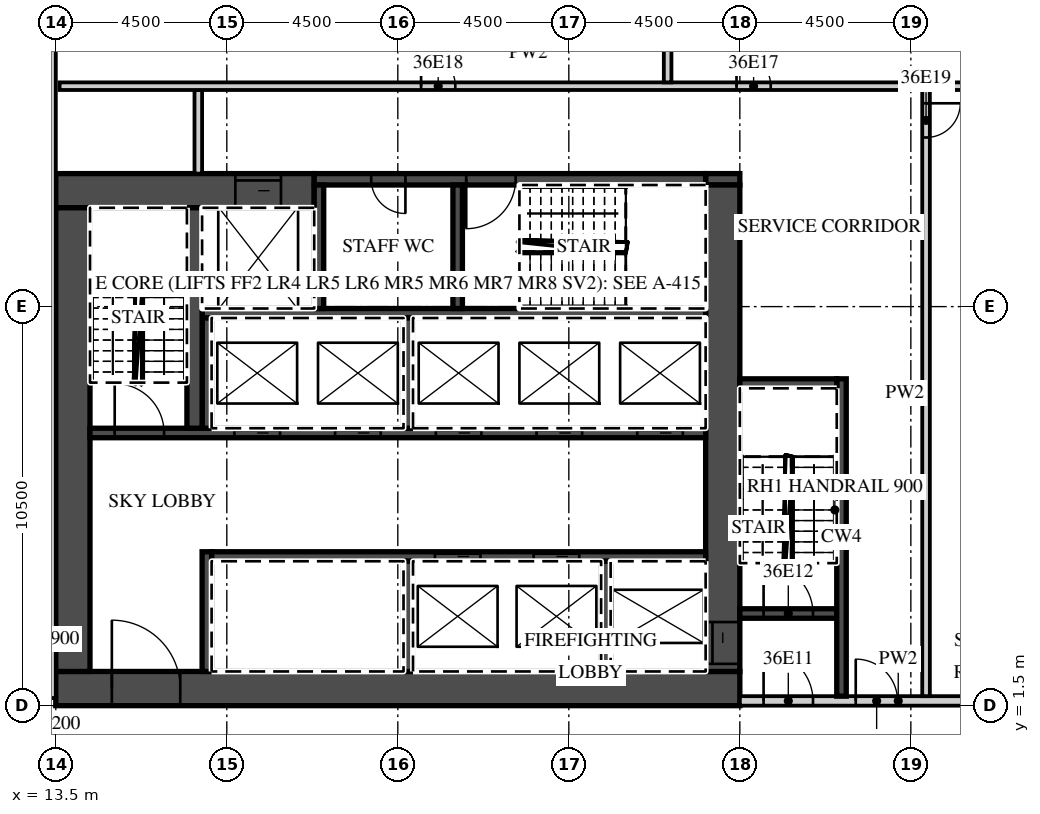
"""IFC4 building model, lengths in metres.
Left out: names, types, materials, properties, quantities, classifications, styles, units other than length and angle.
Written with IfcOpenShell. Run it as: python <this file> out.ifc"""

import sys

from ifc_helpers import new_model, si_unit, direction, frame, frame_2d, origin, place, context, subcontext, project, spatial, rectangle, extrude, element, fill, save


model = new_model("IFC4")
c1 = context("Model", 3, precision=1e-05, world=origin(), true_north=direction((0.0, 1.0)))
c2 = subcontext(c1, "Body", "Model", "MODEL_VIEW")
j1 = project(units=[si_unit("LENGTHUNIT", "METRE"), si_unit("PLANEANGLEUNIT", "RADIAN")], contexts=[c1])
p1 = place(None, origin())
s1 = spatial("IfcSite", under=j1, at=p1, CompositionType="ELEMENT")
p2 = place(p1, origin())
s2 = spatial("IfcBuilding", under=s1, at=p2, CompositionType="ELEMENT")
p3 = place(p2, frame((0.0, 0.0, 155.0)))
s3 = spatial("IfcBuildingStorey", under=s2, at=p3, CompositionType="ELEMENT", Elevation=155.0)
p4 = place(p3, frame((13.5, 1.95, 0.0), z_axis=(0.0, 0.0, 1.0), x_axis=(1.0, 0.0, 0.0)))
e1 = element("IfcWall", 1, at=p4, inside=s3, PredefinedType="SHEAR", context=c2, shape_type="SweptSolid", body=[
    extrude(rectangle(XDim=18.0, YDim=0.9, at=frame_2d((9.0, 0.0))), origin(), (0.0, 0.0, 1.0), 7.0),
])
p5 = place(p4, frame((1.475, 0.0, 0.0)))
e2 = element("IfcOpeningElement", 2, at=p5, cuts=e1, PredefinedType="OPENING", context=c2, shape_type="SweptSolid", body=[
    extrude(rectangle(XDim=1.8, YDim=2.1, at=frame_2d((0.9, 1.05))), frame((0.0, 0.46, 0.0), z_axis=(0.0, -1.0, 0.0), x_axis=(1.0, 0.0, 0.0)), (0.0, 0.0, 1.0), 0.92),
])
p6 = place(p3, frame((13.5, 15.05, 0.0), z_axis=(0.0, 0.0, 1.0), x_axis=(1.0, 0.0, 0.0)))
e3 = element("IfcWall", 3, at=p6, inside=s3, PredefinedType="SHEAR", context=c2, shape_type="SweptSolid", body=[
    extrude(rectangle(XDim=6.8, YDim=0.9, at=frame_2d((3.4, 0.0))), origin(), (0.0, 0.0, 1.0), 7.0),
])
p7 = place(p6, frame((4.725, 0.0, 0.0)))
e4 = element("IfcOpeningElement", 4, at=p7, cuts=e3, PredefinedType="OPENING", context=c2, shape_type="SweptSolid", body=[
    extrude(rectangle(XDim=1.2, YDim=2.1, at=frame_2d((0.6, 1.05))), frame((0.0, 0.46, 0.0), z_axis=(0.0, -1.0, 0.0), x_axis=(1.0, 0.0, 0.0)), (0.0, 0.0, 1.0), 0.92),
])
p8 = place(p3, frame((30.6, 15.35, 0.0), z_axis=(0.0, 0.0, 1.0), x_axis=(1.0, 0.0, 0.0)))
e5 = element("IfcWall", 5, at=p8, inside=s3, PredefinedType="SHEAR", context=c2, shape_type="SweptSolid", body=[
    extrude(rectangle(XDim=0.9, YDim=0.3, at=frame_2d((0.45, 0.0))), origin(), (0.0, 0.0, 1.0), 7.0),
])
p9 = place(p3, frame((20.3, 15.35, 0.0), z_axis=(0.0, 0.0, 1.0), x_axis=(1.0, 0.0, 0.0)))
e6 = element("IfcWall", 6, at=p9, inside=s3, PredefinedType="SHEAR", context=c2, shape_type="SweptSolid", body=[
    extrude(rectangle(XDim=10.3, YDim=0.3, at=frame_2d((5.15, 0.0))), origin(), (0.0, 0.0, 1.0), 7.0),
])
p10 = place(p9, frame((4.0, 0.0, 0.0)))
e7 = element("IfcOpeningElement", 7, at=p10, cuts=e6, PredefinedType="OPENING", context=c2, shape_type="SweptSolid", body=[
    extrude(rectangle(XDim=1.3, YDim=2.1, at=frame_2d((0.65, 1.05))), frame((0.0, 0.16, 0.0), z_axis=(0.0, -1.0, 0.0), x_axis=(1.0, 0.0, 0.0)), (0.0, 0.0, 1.0), 0.32),
])
p11 = place(p9, frame((1.5, 0.0, 0.0)))
e8 = element("IfcOpeningElement", 8, at=p11, cuts=e6, PredefinedType="OPENING", context=c2, shape_type="SweptSolid", body=[
    extrude(rectangle(XDim=0.9, YDim=2.1, at=frame_2d((0.45, 1.05))), frame((0.0, 0.16, 0.0), z_axis=(0.0, -1.0, 0.0), x_axis=(1.0, 0.0, 0.0)), (0.0, 0.0, 1.0), 0.32),
])
p12 = place(p3, frame((31.05, 2.4, 0.0), z_axis=(0.0, 0.0, 1.0), x_axis=(0.0, 1.0, 0.0)))
e9 = element("IfcWall", 9, at=p12, inside=s3, PredefinedType="SHEAR", context=c2, shape_type="SweptSolid", body=[
    extrude(rectangle(XDim=12.8, YDim=0.9, at=frame_2d((6.4, 0.0))), origin(), (0.0, 0.0, 1.0), 7.0),
])
p13 = place(p12, frame((0.2, 0.0, 0.0)))
e10 = element("IfcOpeningElement", 10, at=p13, cuts=e9, PredefinedType="OPENING", context=c2, shape_type="SweptSolid", body=[
    extrude(rectangle(XDim=1.1, YDim=2.1, at=frame_2d((0.55, 1.05))), frame((0.0, 0.46, 0.0), z_axis=(0.0, -1.0, 0.0), x_axis=(1.0, 0.0, 0.0)), (0.0, 0.0, 1.0), 0.92),
])
p14 = place(p3, frame((13.95, 2.4, 0.0), z_axis=(0.0, 0.0, 1.0), x_axis=(0.0, 1.0, 0.0)))
e11 = element("IfcWall", 11, at=p14, inside=s3, PredefinedType="SHEAR", context=c2, shape_type="SweptSolid", body=[
    extrude(rectangle(XDim=12.2, YDim=0.9, at=frame_2d((6.1, 0.0))), origin(), (0.0, 0.0, 1.0), 7.0),
])
p15 = place(p3, frame((17.6, 5.425, 0.0), z_axis=(0.0, 0.0, 1.0), x_axis=(1.0, 0.0, 0.0)))
e12 = element("IfcWall", 12, at=p15, inside=s3, PredefinedType="SHEAR", context=c2, shape_type="SweptSolid", body=[
    extrude(rectangle(XDim=13.0, YDim=0.25, at=frame_2d((6.5, 0.0))), origin(), (0.0, 0.0, 1.0), 7.0),
])
p16 = place(p15, frame((8.475, 0.0, 0.0)))
e13 = element("IfcOpeningElement", 13, at=p16, cuts=e12, PredefinedType="OPENING", context=c2, shape_type="SweptSolid", body=[
    extrude(rectangle(XDim=1.2, YDim=2.1, at=frame_2d((0.6, 1.05))), frame((0.0, 0.135, 0.0), z_axis=(0.0, -1.0, 0.0), x_axis=(1.0, 0.0, 0.0)), (0.0, 0.0, 1.0), 0.27),
])
p17 = place(p15, frame((5.875, 0.0, 0.0)))
e14 = element("IfcOpeningElement", 14, at=p17, cuts=e12, PredefinedType="OPENING", context=c2, shape_type="SweptSolid", body=[
    extrude(rectangle(XDim=1.2, YDim=2.1, at=frame_2d((0.6, 1.05))), frame((0.0, 0.135, 0.0), z_axis=(0.0, -1.0, 0.0), x_axis=(1.0, 0.0, 0.0)), (0.0, 0.0, 1.0), 0.27),
])
p18 = place(p3, frame((17.475, 2.4, 0.0), z_axis=(0.0, 0.0, 1.0), x_axis=(0.0, 1.0, 0.0)))
e15 = element("IfcWall", 15, at=p18, inside=s3, PredefinedType="SHEAR", context=c2, shape_type="SweptSolid", body=[
    extrude(rectangle(XDim=3.15, YDim=0.25, at=frame_2d((1.575, 0.0))), origin(), (0.0, 0.0, 1.0), 7.0),
])
for number, where, z_axis, x_axis in (
    (16, (27.975, 2.4, 0.0), (0.0, 0.0, 1.0), (0.0, 1.0, 0.0)),
    (17, (22.775, 2.4, 0.0), (0.0, 0.0, 1.0), (0.0, 1.0, 0.0)),
):
    element("IfcWall", number, at=place(p3, frame(where, z_axis=z_axis, x_axis=x_axis)), inside=s3, PredefinedType="SHEAR", context=c2, shape_type="SweptSolid", body=[
        extrude(rectangle(XDim=2.9, YDim=0.25, at=frame_2d((1.45, 0.0))), origin(), (0.0, 0.0, 1.0), 7.0),
    ])
p19 = place(p3, frame((14.4, 8.675, 0.0), z_axis=(0.0, 0.0, 1.0), x_axis=(1.0, 0.0, 0.0)))
e18 = element("IfcWall", 18, at=p19, inside=s3, PredefinedType="SHEAR", context=c2, shape_type="SweptSolid", body=[
    extrude(rectangle(XDim=16.2, YDim=0.25, at=frame_2d((8.1, 0.0))), origin(), (0.0, 0.0, 1.0), 7.0),
])
p20 = place(p19, frame((14.4, 0.0, 0.0)))
e19 = element("IfcOpeningElement", 19, at=p20, cuts=e18, PredefinedType="OPENING", context=c2, shape_type="SweptSolid", body=[
    extrude(rectangle(XDim=1.2, YDim=2.1, at=frame_2d((0.6, 1.05))), frame((0.0, 0.135, 0.0), z_axis=(0.0, -1.0, 0.0), x_axis=(1.0, 0.0, 0.0)), (0.0, 0.0, 1.0), 0.27),
])
p21 = place(p19, frame((11.75, 0.0, 0.0)))
e20 = element("IfcOpeningElement", 20, at=p21, cuts=e18, PredefinedType="OPENING", context=c2, shape_type="SweptSolid", body=[
    extrude(rectangle(XDim=1.2, YDim=2.1, at=frame_2d((0.6, 1.05))), frame((0.0, 0.135, 0.0), z_axis=(0.0, -1.0, 0.0), x_axis=(1.0, 0.0, 0.0)), (0.0, 0.0, 1.0), 0.27),
])
p22 = place(p19, frame((9.1, 0.0, 0.0)))
e21 = element("IfcOpeningElement", 21, at=p22, cuts=e18, PredefinedType="OPENING", context=c2, shape_type="SweptSolid", body=[
    extrude(rectangle(XDim=1.2, YDim=2.1, at=frame_2d((0.6, 1.05))), frame((0.0, 0.135, 0.0), z_axis=(0.0, -1.0, 0.0), x_axis=(1.0, 0.0, 0.0)), (0.0, 0.0, 1.0), 0.27),
])
p23 = place(p19, frame((6.45, 0.0, 0.0)))
e22 = element("IfcOpeningElement", 22, at=p23, cuts=e18, PredefinedType="OPENING", context=c2, shape_type="SweptSolid", body=[
    extrude(rectangle(XDim=1.2, YDim=2.1, at=frame_2d((0.6, 1.05))), frame((0.0, 0.135, 0.0), z_axis=(0.0, -1.0, 0.0), x_axis=(1.0, 0.0, 0.0)), (0.0, 0.0, 1.0), 0.27),
])
p24 = place(p19, frame((3.8, 0.0, 0.0)))
e23 = element("IfcOpeningElement", 23, at=p24, cuts=e18, PredefinedType="OPENING", context=c2, shape_type="SweptSolid", body=[
    extrude(rectangle(XDim=1.2, YDim=2.1, at=frame_2d((0.6, 1.05))), frame((0.0, 0.135, 0.0), z_axis=(0.0, -1.0, 0.0), x_axis=(1.0, 0.0, 0.0)), (0.0, 0.0, 1.0), 0.27),
])
p25 = place(p19, frame((0.65, 0.0, 0.0)))
e24 = element("IfcOpeningElement", 24, at=p25, cuts=e18, PredefinedType="OPENING", context=c2, shape_type="SweptSolid", body=[
    extrude(rectangle(XDim=1.3, YDim=2.1, at=frame_2d((0.65, 1.05))), frame((0.0, 0.135, 0.0), z_axis=(0.0, -1.0, 0.0), x_axis=(1.0, 0.0, 0.0)), (0.0, 0.0, 1.0), 0.27),
])
p26 = place(p3, frame((17.35, 11.825, 0.0), z_axis=(0.0, 0.0, 1.0), x_axis=(1.0, 0.0, 0.0)))
e25 = element("IfcWall", 25, at=p26, inside=s3, PredefinedType="SHEAR", context=c2, shape_type="SweptSolid", body=[
    extrude(rectangle(XDim=13.25, YDim=0.25, at=frame_2d((6.625, 0.0))), origin(), (0.0, 0.0, 1.0), 7.0),
])
for number, where, z_axis, x_axis in (
    (26, (17.475, 8.8, 0.0), (0.0, 0.0, 1.0), (0.0, 1.0, 0.0)),
    (27, (22.775, 8.8, 0.0), (0.0, 0.0, 1.0), (0.0, 1.0, 0.0)),
):
    element("IfcWall", number, at=place(p3, frame(where, z_axis=z_axis, x_axis=x_axis)), inside=s3, PredefinedType="SHEAR", context=c2, shape_type="SweptSolid", body=[
        extrude(rectangle(XDim=2.9, YDim=0.25, at=frame_2d((1.45, 0.0))), origin(), (0.0, 0.0, 1.0), 7.0),
    ])
p27 = place(p3, frame((17.15, 8.8, 0.0), z_axis=(0.0, 0.0, 1.0), x_axis=(0.0, 1.0, 0.0)))
e28 = element("IfcWall", 28, at=p27, inside=s3, PredefinedType="SHEAR", context=c2, shape_type="SweptSolid", body=[
    extrude(rectangle(XDim=5.8, YDim=0.4, at=frame_2d((2.9, 0.0))), origin(), (0.0, 0.0, 1.0), 7.0),
])
for number, where, z_axis, x_axis in (
    (29, (20.425, 11.95, 0.0), (0.0, 0.0, 1.0), (0.0, 1.0, 0.0)),
    (30, (24.075, 11.95, 0.0), (0.0, 0.0, 1.0), (0.0, 1.0, 0.0)),
):
    element("IfcWall", number, at=place(p3, frame(where, z_axis=z_axis, x_axis=x_axis)), inside=s3, PredefinedType="SHEAR", context=c2, shape_type="SweptSolid", body=[
        extrude(rectangle(XDim=3.25, YDim=0.25, at=frame_2d((1.625, 0.0))), origin(), (0.0, 0.0, 1.0), 7.0),
    ])
p28 = place(p3, frame((31.5, 1.625, 0.0), z_axis=(0.0, 0.0, 1.0), x_axis=(1.0, 0.0, 0.0)))
e31 = element("IfcWall", 31, at=p28, inside=s3, PredefinedType="PARTITIONING", context=c2, shape_type="SweptSolid", body=[
    extrude(rectangle(XDim=8.337, YDim=0.25, at=frame_2d((4.168, 0.0))), origin(), (0.0, 0.0, 1.0), 7.0),
])
p29 = place(p28, frame((0.625, 0.0, 0.0)))
e32 = element("IfcOpeningElement", 32, at=p29, cuts=e31, PredefinedType="OPENING", context=c2, shape_type="SweptSolid", body=[
    extrude(rectangle(XDim=1.3, YDim=2.1, at=frame_2d((0.65, 1.05))), frame((0.0, 0.135, 0.0), z_axis=(0.0, -1.0, 0.0), x_axis=(1.0, 0.0, 0.0)), (0.0, 0.0, 1.0), 0.27),
])
p30 = place(p28, frame((3.05, 0.0, 0.0)))
e33 = element("IfcOpeningElement", 33, at=p30, cuts=e31, PredefinedType="OPENING", context=c2, shape_type="SweptSolid", body=[
    extrude(rectangle(XDim=1.1, YDim=2.1, at=frame_2d((0.55, 1.05))), frame((0.0, 0.135, 0.0), z_axis=(0.0, -1.0, 0.0), x_axis=(1.0, 0.0, 0.0)), (0.0, 0.0, 1.0), 0.27),
])
p31 = place(p3, frame((31.5, 3.925, 0.0), z_axis=(0.0, 0.0, 1.0), x_axis=(1.0, 0.0, 0.0)))
e34 = element("IfcWall", 34, at=p31, inside=s3, PredefinedType="SHEAR", context=c2, shape_type="SweptSolid", body=[
    extrude(rectangle(XDim=2.55, YDim=0.25, at=frame_2d((1.275, 0.0))), origin(), (0.0, 0.0, 1.0), 7.0),
])
p32 = place(p31, frame((0.625, 0.0, 0.0)))
e35 = element("IfcOpeningElement", 35, at=p32, cuts=e34, PredefinedType="OPENING", context=c2, shape_type="SweptSolid", body=[
    extrude(rectangle(XDim=1.3, YDim=2.1, at=frame_2d((0.65, 1.05))), frame((0.0, 0.135, 0.0), z_axis=(0.0, -1.0, 0.0), x_axis=(1.0, 0.0, 0.0)), (0.0, 0.0, 1.0), 0.27),
])
p33 = place(p3, frame((34.175, 1.75, 0.0), z_axis=(0.0, 0.0, 1.0), x_axis=(0.0, 1.0, 0.0)))
e36 = element("IfcWall", 36, at=p33, inside=s3, PredefinedType="SHEAR", context=c2, shape_type="SweptSolid", body=[
    extrude(rectangle(XDim=8.35, YDim=0.25, at=frame_2d((4.175, 0.0))), origin(), (0.0, 0.0, 1.0), 7.0),
])
p34 = place(p3, frame((31.5, 9.975, 0.0), z_axis=(0.0, 0.0, 1.0), x_axis=(1.0, 0.0, 0.0)))
e37 = element("IfcWall", 37, at=p34, inside=s3, PredefinedType="SHEAR", context=c2, shape_type="SweptSolid", body=[
    extrude(rectangle(XDim=2.55, YDim=0.25, at=frame_2d((1.275, 0.0))), origin(), (0.0, 0.0, 1.0), 7.0),
])
p35 = place(p3, frame((17.25, 15.5, 0.0), z_axis=(0.0, 0.0, 1.0), x_axis=(0.0, 1.0, 0.0)))
e38 = element("IfcWall", 38, at=p35, inside=s3, PredefinedType="PARTITIONING", context=c2, shape_type="SweptSolid", body=[
    extrude(rectangle(XDim=2.2, YDim=0.2, at=frame_2d((1.1, 0.0))), origin(), (0.0, 0.0, 1.0), 7.0),
])
p36 = place(p3, frame((36.4, 1.75, 0.0), z_axis=(0.0, 0.0, 1.0), x_axis=(0.0, 1.0, 0.0)))
e39 = element("IfcWall", 39, at=p36, inside=s3, PredefinedType="PARTITIONING", context=c2, shape_type="SweptSolid", body=[
    extrude(rectangle(XDim=15.95, YDim=0.2, at=frame_2d((7.975, 0.0))), origin(), (0.0, 0.0, 1.0), 7.0),
])
p37 = place(p36, frame((14.7, 0.0, 0.0)))
e40 = element("IfcOpeningElement", 40, at=p37, cuts=e39, PredefinedType="OPENING", context=c2, shape_type="SweptSolid", body=[
    extrude(rectangle(XDim=0.9, YDim=2.1, at=frame_2d((0.45, 1.05))), frame((0.0, 0.11, 0.0), z_axis=(0.0, -1.0, 0.0), x_axis=(1.0, 0.0, 0.0)), (0.0, 0.0, 1.0), 0.22),
])
p38 = place(p3, frame((13.6, 17.8, 0.0), z_axis=(0.0, 0.0, 1.0), x_axis=(1.0, 0.0, 0.0)))
e41 = element("IfcWall", 41, at=p38, inside=s3, PredefinedType="PARTITIONING", context=c2, shape_type="SweptSolid", body=[
    extrude(rectangle(XDim=24.679, YDim=0.2, at=frame_2d((12.34, 0.0))), origin(), (0.0, 0.0, 1.0), 7.0),
])
p39 = place(p38, frame((17.812, 0.0, 0.0)))
e42 = element("IfcOpeningElement", 42, at=p39, cuts=e41, PredefinedType="OPENING", context=c2, shape_type="SweptSolid", body=[
    extrude(rectangle(XDim=0.9, YDim=2.1, at=frame_2d((0.45, 1.05))), frame((0.0, 0.11, 0.0), z_axis=(0.0, -1.0, 0.0), x_axis=(1.0, 0.0, 0.0)), (0.0, 0.0, 1.0), 0.22),
])
p40 = place(p38, frame((9.512, 0.0, 0.0)))
e43 = element("IfcOpeningElement", 43, at=p40, cuts=e41, PredefinedType="OPENING", context=c2, shape_type="SweptSolid", body=[
    extrude(rectangle(XDim=0.9, YDim=2.1, at=frame_2d((0.45, 1.05))), frame((0.0, 0.11, 0.0), z_axis=(0.0, -1.0, 0.0), x_axis=(1.0, 0.0, 0.0)), (0.0, 0.0, 1.0), 0.22),
])
p41 = place(p3, frame((29.6, 17.9, 0.0), z_axis=(0.0, 0.0, 1.0), x_axis=(0.0, 1.0, 0.0)))
e44 = element("IfcWall", 44, at=p41, inside=s3, PredefinedType="PARTITIONING", context=c2, shape_type="SweptSolid", body=[
    extrude(rectangle(XDim=5.241, YDim=0.2, at=frame_2d((2.62, 0.0))), origin(), (0.0, 0.0, 1.0), 7.0),
])
p42 = place(p3, frame((13.4, 1.7, 0.0), z_axis=(0.0, 0.0, 1.0), x_axis=(0.0, 1.0, 0.0)))
e45 = element("IfcWall", 45, at=p42, inside=s3, PredefinedType="PARTITIONING", context=c2, shape_type="SweptSolid", body=[
    extrude(rectangle(XDim=20.181, YDim=0.2, at=frame_2d((10.091, 0.0))), origin(), (0.0, 0.0, 1.0), 7.0),
])
p43 = place(p20, origin())
e46 = element("IfcDoor", 46, at=p43, inside=s3, OperationType="SLIDING_TO_LEFT", PredefinedType="DOOR", context=c2, shape_type="SweptSolid", body=[
    extrude(rectangle(XDim=1.2, YDim=2.1, at=frame_2d((0.6, 1.05))), frame((0.0, 0.025, 0.0), z_axis=(0.0, -1.0, 0.0), x_axis=(1.0, 0.0, 0.0)), (0.0, 0.0, 1.0), 0.05),
])
fill(e19, e46)
p44 = place(p21, origin())
e47 = element("IfcDoor", 47, at=p44, inside=s3, OperationType="SLIDING_TO_RIGHT", PredefinedType="DOOR", context=c2, shape_type="SweptSolid", body=[
    extrude(rectangle(XDim=1.2, YDim=2.1, at=frame_2d((0.6, 1.05))), frame((0.0, 0.025, 0.0), z_axis=(0.0, -1.0, 0.0), x_axis=(1.0, 0.0, 0.0)), (0.0, 0.0, 1.0), 0.05),
])
fill(e20, e47)
p45 = place(p22, origin())
e48 = element("IfcDoor", 48, at=p45, inside=s3, OperationType="SLIDING_TO_RIGHT", PredefinedType="DOOR", context=c2, shape_type="SweptSolid", body=[
    extrude(rectangle(XDim=1.2, YDim=2.1, at=frame_2d((0.6, 1.05))), frame((0.0, 0.025, 0.0), z_axis=(0.0, -1.0, 0.0), x_axis=(1.0, 0.0, 0.0)), (0.0, 0.0, 1.0), 0.05),
])
fill(e21, e48)
p46 = place(p23, origin())
e49 = element("IfcDoor", 49, at=p46, inside=s3, OperationType="SLIDING_TO_LEFT", PredefinedType="DOOR", context=c2, shape_type="SweptSolid", body=[
    extrude(rectangle(XDim=1.2, YDim=2.1, at=frame_2d((0.6, 1.05))), frame((0.0, 0.025, 0.0), z_axis=(0.0, -1.0, 0.0), x_axis=(1.0, 0.0, 0.0)), (0.0, 0.0, 1.0), 0.05),
])
fill(e22, e49)
p47 = place(p24, origin())
e50 = element("IfcDoor", 50, at=p47, inside=s3, OperationType="SLIDING_TO_RIGHT", PredefinedType="DOOR", context=c2, shape_type="SweptSolid", body=[
    extrude(rectangle(XDim=1.2, YDim=2.1, at=frame_2d((0.6, 1.05))), frame((0.0, 0.025, 0.0), z_axis=(0.0, -1.0, 0.0), x_axis=(1.0, 0.0, 0.0)), (0.0, 0.0, 1.0), 0.05),
])
fill(e23, e50)
p48 = place(p16, origin())
e51 = element("IfcDoor", 51, at=p48, inside=s3, OperationType="SLIDING_TO_LEFT", PredefinedType="DOOR", context=c2, shape_type="SweptSolid", body=[
    extrude(rectangle(XDim=1.2, YDim=2.1, at=frame_2d((0.6, 1.05))), frame((0.0, 0.025, 0.0), z_axis=(0.0, -1.0, 0.0), x_axis=(1.0, 0.0, 0.0)), (0.0, 0.0, 1.0), 0.05),
])
fill(e13, e51)
p49 = place(p17, origin())
e52 = element("IfcDoor", 52, at=p49, inside=s3, OperationType="SLIDING_TO_RIGHT", PredefinedType="DOOR", context=c2, shape_type="SweptSolid", body=[
    extrude(rectangle(XDim=1.2, YDim=2.1, at=frame_2d((0.6, 1.05))), frame((0.0, 0.025, 0.0), z_axis=(0.0, -1.0, 0.0), x_axis=(1.0, 0.0, 0.0)), (0.0, 0.0, 1.0), 0.05),
])
fill(e14, e52)
p50 = place(p7, origin())
e53 = element("IfcDoor", 53, at=p50, inside=s3, OperationType="SLIDING_TO_LEFT", PredefinedType="DOOR", context=c2, shape_type="SweptSolid", body=[
    extrude(rectangle(XDim=1.2, YDim=2.1, at=frame_2d((0.6, 1.05))), frame((0.0, 0.025, 0.0), z_axis=(0.0, -1.0, 0.0), x_axis=(1.0, 0.0, 0.0)), (0.0, 0.0, 1.0), 0.05),
])
fill(e4, e53)
p51 = place(p13, origin())
e54 = element("IfcDoor", 54, at=p51, inside=s3, OperationType="SLIDING_TO_LEFT", PredefinedType="DOOR", context=c2, shape_type="SweptSolid", body=[
    extrude(rectangle(XDim=1.1, YDim=2.1, at=frame_2d((0.55, 1.05))), frame((0.0, 0.025, 0.0), z_axis=(0.0, -1.0, 0.0), x_axis=(1.0, 0.0, 0.0)), (0.0, 0.0, 1.0), 0.05),
])
fill(e10, e54)
p52 = place(p5, origin())
e55 = element("IfcDoor", 55, at=p52, inside=s3, OperationType="DOUBLE_DOOR_DOUBLE_SWING", PredefinedType="DOOR", context=c2, shape_type="SweptSolid", body=[
    extrude(rectangle(XDim=1.8, YDim=2.1, at=frame_2d((0.9, 1.05))), frame((0.0, 0.025, 0.0), z_axis=(0.0, -1.0, 0.0), x_axis=(1.0, 0.0, 0.0)), (0.0, 0.0, 1.0), 0.05),
])
fill(e2, e55)
p53 = place(p29, origin())
e56 = element("IfcDoor", 56, at=p53, inside=s3, OperationType="SINGLE_SWING_LEFT", PredefinedType="DOOR", context=c2, shape_type="SweptSolid", body=[
    extrude(rectangle(XDim=1.3, YDim=2.1, at=frame_2d((0.65, 1.05))), frame((0.0, 0.025, 0.0), z_axis=(0.0, -1.0, 0.0), x_axis=(1.0, 0.0, 0.0)), (0.0, 0.0, 1.0), 0.05),
])
fill(e32, e56)
p54 = place(p32, origin())
e57 = element("IfcDoor", 57, at=p54, inside=s3, OperationType="SINGLE_SWING_LEFT", PredefinedType="DOOR", context=c2, shape_type="SweptSolid", body=[
    extrude(rectangle(XDim=1.3, YDim=2.1, at=frame_2d((0.65, 1.05))), frame((0.0, 0.025, 0.0), z_axis=(0.0, -1.0, 0.0), x_axis=(1.0, 0.0, 0.0)), (0.0, 0.0, 1.0), 0.05),
])
fill(e35, e57)
p55 = place(p30, origin())
e58 = element("IfcDoor", 58, at=p55, inside=s3, OperationType="SINGLE_SWING_LEFT", PredefinedType="DOOR", context=c2, shape_type="SweptSolid", body=[
    extrude(rectangle(XDim=1.1, YDim=2.1, at=frame_2d((0.55, 1.05))), frame((0.0, 0.025, 0.0), z_axis=(0.0, -1.0, 0.0), x_axis=(1.0, 0.0, 0.0)), (0.0, 0.0, 1.0), 0.05),
])
fill(e33, e58)
p56 = place(p25, origin())
e59 = element("IfcDoor", 59, at=p56, inside=s3, OperationType="SINGLE_SWING_LEFT", PredefinedType="DOOR", context=c2, shape_type="SweptSolid", body=[
    extrude(rectangle(XDim=1.3, YDim=2.1, at=frame_2d((0.65, 1.05))), frame((0.0, 0.025, 0.0), z_axis=(0.0, -1.0, 0.0), x_axis=(1.0, 0.0, 0.0)), (0.0, 0.0, 1.0), 0.05),
])
fill(e24, e59)
p57 = place(p10, origin())
e60 = element("IfcDoor", 60, at=p57, inside=s3, OperationType="SINGLE_SWING_LEFT", PredefinedType="DOOR", context=c2, shape_type="SweptSolid", body=[
    extrude(rectangle(XDim=1.3, YDim=2.1, at=frame_2d((0.65, 1.05))), frame((0.0, 0.025, 0.0), z_axis=(0.0, -1.0, 0.0), x_axis=(1.0, 0.0, 0.0)), (0.0, 0.0, 1.0), 0.05),
])
fill(e7, e60)
p58 = place(p11, origin())
e61 = element("IfcDoor", 61, at=p58, inside=s3, OperationType="SINGLE_SWING_RIGHT", PredefinedType="DOOR", context=c2, shape_type="SweptSolid", body=[
    extrude(rectangle(XDim=0.9, YDim=2.1, at=frame_2d((0.45, 1.05))), frame((0.0, 0.025, 0.0), z_axis=(0.0, -1.0, 0.0), x_axis=(1.0, 0.0, 0.0)), (0.0, 0.0, 1.0), 0.05),
])
fill(e8, e61)
p59 = place(p39, origin())
e62 = element("IfcDoor", 62, at=p59, inside=s3, OperationType="SINGLE_SWING_LEFT", PredefinedType="DOOR", context=c2, shape_type="SweptSolid", body=[
    extrude(rectangle(XDim=0.9, YDim=2.1, at=frame_2d((0.45, 1.05))), frame((0.0, 0.025, 0.0), z_axis=(0.0, -1.0, 0.0), x_axis=(1.0, 0.0, 0.0)), (0.0, 0.0, 1.0), 0.05),
])
fill(e42, e62)
p60 = place(p40, origin())
e63 = element("IfcDoor", 63, at=p60, inside=s3, OperationType="SINGLE_SWING_LEFT", PredefinedType="DOOR", context=c2, shape_type="SweptSolid", body=[
    extrude(rectangle(XDim=0.9, YDim=2.1, at=frame_2d((0.45, 1.05))), frame((0.0, 0.025, 0.0), z_axis=(0.0, -1.0, 0.0), x_axis=(1.0, 0.0, 0.0)), (0.0, 0.0, 1.0), 0.05),
])
fill(e43, e63)
p61 = place(p37, origin())
e64 = element("IfcDoor", 64, at=p61, inside=s3, OperationType="SINGLE_SWING_RIGHT", PredefinedType="DOOR", context=c2, shape_type="SweptSolid", body=[
    extrude(rectangle(XDim=0.9, YDim=2.1, at=frame_2d((0.45, 1.05))), frame((0.0, 0.025, 0.0), z_axis=(0.0, -1.0, 0.0), x_axis=(1.0, 0.0, 0.0)), (0.0, 0.0, 1.0), 0.05),
])
fill(e40, e64)
save(model, sys.argv[1])
